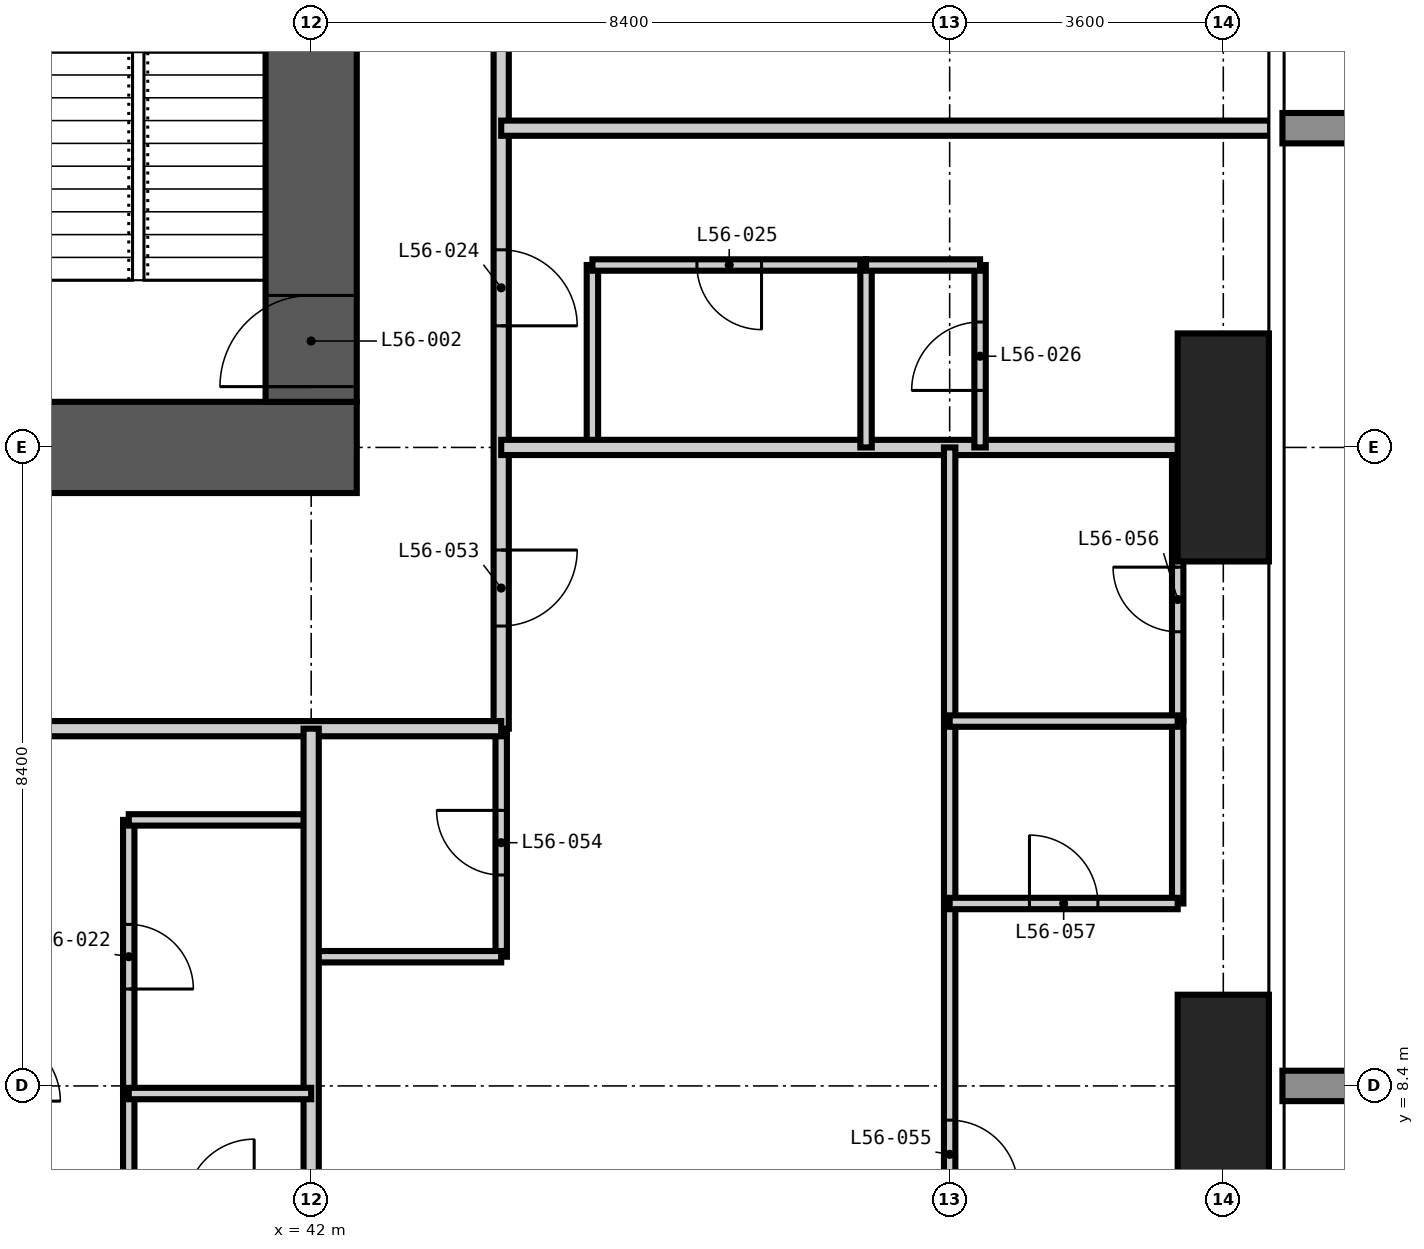
"""IFC4 building model, lengths in metres.
Left out: names, types, materials, properties, quantities, classifications, styles, units other than length and angle.
Written with IfcOpenShell. Run it as: python <this file> out.ifc"""

import sys

from ifc_helpers import new_model, si_unit, direction, frame, frame_2d, origin, origin_2d, place, context, subcontext, project, spatial, rectangle, extrude, element, fill, save


model = new_model("IFC4")
c1 = context("Model", 3, precision=1e-05, world=origin(), true_north=direction((0.0, 1.0)))
c2 = subcontext(c1, "Body", "Model", "MODEL_VIEW")
j1 = project(units=[si_unit("LENGTHUNIT", "METRE"), si_unit("PLANEANGLEUNIT", "RADIAN")], contexts=[c1])
p1 = place(None, origin())
s1 = spatial("IfcSite", under=j1, at=p1, CompositionType="ELEMENT")
p2 = place(p1, origin())
s2 = spatial("IfcBuilding", under=s1, at=p2, CompositionType="ELEMENT")
p3 = place(p2, frame((0.0, 0.0, 216.6)))
s3 = spatial("IfcBuildingStorey", under=s2, at=p3, CompositionType="ELEMENT", Elevation=216.6)
p4 = place(p3, frame((54.0, 8.4, -0.35), z_axis=(0.0, 0.0, 1.0), x_axis=(1.0, 0.0, 0.0)))
e1 = element("IfcColumn", 1, at=p4, inside=s3, PredefinedType="COLUMN", context=c2, shape_type="SweptSolid", body=[
    extrude(rectangle(XDim=1.2, YDim=2.4, at=origin_2d()), origin(), (0.0, 0.0, 1.0), 3.55),
])
p5 = place(p3, frame((54.0, 16.8, -0.35), z_axis=(0.0, 0.0, 1.0), x_axis=(1.0, 0.0, 0.0)))
e2 = element("IfcColumn", 2, at=p5, inside=s3, PredefinedType="COLUMN", context=c2, shape_type="SweptSolid", body=[
    extrude(rectangle(XDim=1.2, YDim=3.0, at=origin_2d()), origin(), (0.0, 0.0, 1.0), 3.55),
])
p6 = place(p3, frame((16.2, 16.8, -0.35), z_axis=(0.0, 0.0, 1.0), x_axis=(1.0, 0.0, 0.0)))
e3 = element("IfcWall", 3, at=p6, inside=s3, PredefinedType="SHEAR", context=c2, shape_type="SweptSolid", body=[
    extrude(rectangle(XDim=26.4, YDim=1.2, at=frame_2d((13.2, 0.0))), origin(), (0.0, 0.0, 1.0), 3.55),
])
p7 = place(p6, frame((12.7, 0.0, 0.35)))
e4 = element("IfcOpeningElement", 4, at=p7, cuts=e3, PredefinedType="OPENING", context=c2, shape_type="SweptSolid", body=[
    extrude(rectangle(XDim=1.0, YDim=2.1, at=frame_2d((0.5, 1.05))), frame((0.0, 0.61, 0.0), z_axis=(0.0, -1.0, 0.0), x_axis=(1.0, 0.0, 0.0)), (0.0, 0.0, 1.0), 1.22),
])
p8 = place(p6, frame((19.0, 0.0, 0.35)))
e5 = element("IfcOpeningElement", 5, at=p8, cuts=e3, PredefinedType="OPENING", context=c2, shape_type="SweptSolid", body=[
    extrude(rectangle(XDim=1.0, YDim=2.1, at=frame_2d((0.5, 1.05))), frame((0.0, 0.61, 0.0), z_axis=(0.0, -1.0, 0.0), x_axis=(1.0, 0.0, 0.0)), (0.0, 0.0, 1.0), 1.22),
])
p9 = place(p3, frame((42.0, 17.4, -0.35), z_axis=(0.0, 0.0, 1.0), x_axis=(0.0, 1.0, 0.0)))
e6 = element("IfcWall", 6, at=p9, inside=s3, PredefinedType="SHEAR", context=c2, shape_type="SweptSolid", body=[
    extrude(rectangle(XDim=24.0, YDim=1.2, at=frame_2d((12.0, 0.0))), origin(), (0.0, 0.0, 1.0), 3.55),
])
p10 = place(p9, frame((0.2, 0.0, 0.35)))
e7 = element("IfcOpeningElement", 7, at=p10, cuts=e6, PredefinedType="OPENING", context=c2, shape_type="SweptSolid", body=[
    extrude(rectangle(XDim=1.2, YDim=2.2, at=frame_2d((0.6, 1.1))), frame((0.0, 0.61, 0.0), z_axis=(0.0, -1.0, 0.0), x_axis=(1.0, 0.0, 0.0)), (0.0, 0.0, 1.0), 1.22),
])
p11 = place(p9, frame((11.5, 0.0, 0.35)))
e8 = element("IfcOpeningElement", 8, at=p11, cuts=e6, PredefinedType="OPENING", context=c2, shape_type="SweptSolid", body=[
    extrude(rectangle(XDim=1.0, YDim=2.1, at=frame_2d((0.5, 1.05))), frame((0.0, 0.61, 0.0), z_axis=(0.0, -1.0, 0.0), x_axis=(1.0, 0.0, 0.0)), (0.0, 0.0, 1.0), 1.22),
])
p12 = place(p9, frame((19.9, 0.0, 0.35)))
e9 = element("IfcOpeningElement", 9, at=p12, cuts=e6, PredefinedType="OPENING", context=c2, shape_type="SweptSolid", body=[
    extrude(rectangle(XDim=1.0, YDim=2.1, at=frame_2d((0.5, 1.05))), frame((0.0, 0.61, 0.0), z_axis=(0.0, -1.0, 0.0), x_axis=(1.0, 0.0, 0.0)), (0.0, 0.0, 1.0), 1.22),
])
p13 = place(p3, frame((39.6, 8.3, 0.0), z_axis=(0.0, 0.0, 1.0), x_axis=(0.0, 1.0, 0.0)))
e10 = element("IfcWall", 10, at=p13, inside=s3, PredefinedType="PARTITIONING", context=c2, shape_type="SweptSolid", body=[
    extrude(rectangle(XDim=3.6, YDim=0.15, at=frame_2d((1.8, 0.0))), origin(), (0.0, 0.0, 1.0), 3.2),
])
p14 = place(p13, frame((1.375, 0.0, 0.0)))
e11 = element("IfcOpeningElement", 11, at=p14, cuts=e10, PredefinedType="OPENING", context=c2, shape_type="SweptSolid", body=[
    extrude(rectangle(XDim=0.85, YDim=2.1, at=frame_2d((0.425, 1.05))), frame((0.0, 0.085, 0.0), z_axis=(0.0, -1.0, 0.0), x_axis=(1.0, 0.0, 0.0)), (0.0, 0.0, 1.0), 0.17),
])
p15 = place(p3, frame((44.5, 10.1, 0.0), z_axis=(0.0, 0.0, 1.0), x_axis=(0.0, 1.0, 0.0)))
e12 = element("IfcWall", 12, at=p15, inside=s3, PredefinedType="PARTITIONING", context=c2, shape_type="SweptSolid", body=[
    extrude(rectangle(XDim=3.0, YDim=0.15, at=frame_2d((1.5, 0.0))), origin(), (0.0, 0.0, 1.0), 3.2),
])
p16 = place(p15, frame((1.075, 0.0, 0.0)))
e13 = element("IfcOpeningElement", 13, at=p16, cuts=e12, PredefinedType="OPENING", context=c2, shape_type="SweptSolid", body=[
    extrude(rectangle(XDim=0.85, YDim=2.1, at=frame_2d((0.425, 1.05))), frame((0.0, 0.085, 0.0), z_axis=(0.0, -1.0, 0.0), x_axis=(1.0, 0.0, 0.0)), (0.0, 0.0, 1.0), 0.17),
])
p17 = place(p3, frame((45.7, 16.8, 0.0), z_axis=(0.0, 0.0, 1.0), x_axis=(0.0, 1.0, 0.0)))
e14 = element("IfcWall", 14, at=p17, inside=s3, PredefinedType="PARTITIONING", context=c2, shape_type="SweptSolid", body=[
    extrude(rectangle(XDim=2.4, YDim=0.15, at=frame_2d((1.2, 0.0))), origin(), (0.0, 0.0, 1.0), 3.2),
])
p18 = place(p3, frame((53.4, 13.2, 0.0), z_axis=(0.0, 0.0, 1.0), x_axis=(0.0, 1.0, 0.0)))
e15 = element("IfcWall", 15, at=p18, inside=s3, PredefinedType="PARTITIONING", context=c2, shape_type="SweptSolid", body=[
    extrude(rectangle(XDim=3.6, YDim=0.15, at=frame_2d((1.8, 0.0))), origin(), (0.0, 0.0, 1.0), 3.2),
])
p19 = place(p18, frame((1.175, 0.0, 0.0)))
e16 = element("IfcOpeningElement", 16, at=p19, cuts=e15, PredefinedType="OPENING", context=c2, shape_type="SweptSolid", body=[
    extrude(rectangle(XDim=0.85, YDim=2.1, at=frame_2d((0.425, 1.05))), frame((0.0, 0.085, 0.0), z_axis=(0.0, -1.0, 0.0), x_axis=(1.0, 0.0, 0.0)), (0.0, 0.0, 1.0), 0.17),
])
p20 = place(p3, frame((42.0, 10.1, 0.0), z_axis=(0.0, 0.0, 1.0), x_axis=(1.0, 0.0, 0.0)))
e17 = element("IfcWall", 17, at=p20, inside=s3, PredefinedType="PARTITIONING", context=c2, shape_type="SweptSolid", body=[
    extrude(rectangle(XDim=2.5, YDim=0.15, at=frame_2d((1.25, 0.0))), origin(), (0.0, 0.0, 1.0), 3.2),
])
p21 = place(p3, frame((39.6, 11.9, 0.0), z_axis=(0.0, 0.0, 1.0), x_axis=(1.0, 0.0, 0.0)))
e18 = element("IfcWall", 18, at=p21, inside=s3, PredefinedType="PARTITIONING", context=c2, shape_type="SweptSolid", body=[
    extrude(rectangle(XDim=2.4, YDim=0.15, at=frame_2d((1.2, 0.0))), origin(), (0.0, 0.0, 1.0), 3.2),
])
p22 = place(p3, frame((45.7, 19.2, 0.0), z_axis=(0.0, 0.0, 1.0), x_axis=(1.0, 0.0, 0.0)))
e19 = element("IfcWall", 19, at=p22, inside=s3, PredefinedType="PARTITIONING", context=c2, shape_type="SweptSolid", body=[
    extrude(rectangle(XDim=3.6, YDim=0.15, at=frame_2d((1.8, 0.0))), origin(), (0.0, 0.0, 1.0), 3.2),
])
p23 = place(p22, frame((1.375, 0.0, 0.0)))
e20 = element("IfcOpeningElement", 20, at=p23, cuts=e19, PredefinedType="OPENING", context=c2, shape_type="SweptSolid", body=[
    extrude(rectangle(XDim=0.85, YDim=2.1, at=frame_2d((0.425, 1.05))), frame((0.0, 0.085, 0.0), z_axis=(0.0, -1.0, 0.0), x_axis=(1.0, 0.0, 0.0)), (0.0, 0.0, 1.0), 0.17),
])
p24 = place(p3, frame((44.5, 45.1, 0.0), z_axis=(0.0, 0.0, 1.0), x_axis=(0.0, -1.0, 0.0)))
e21 = element("IfcWall", 21, at=p24, inside=s3, PredefinedType="PARTITIONING", context=c2, shape_type="SweptSolid", body=[
    extrude(rectangle(XDim=32.0, YDim=0.2, at=frame_2d((16.0, 0.0))), origin(), (0.0, 0.0, 1.0), 3.2),
])
p25 = place(p24, frame((25.7, 0.0, 0.0)))
e22 = element("IfcOpeningElement", 22, at=p25, cuts=e21, PredefinedType="OPENING", context=c2, shape_type="SweptSolid", body=[
    extrude(rectangle(XDim=1.0, YDim=2.2, at=frame_2d((0.5, 1.1))), frame((0.0, 0.11, 0.0), z_axis=(0.0, -1.0, 0.0), x_axis=(1.0, 0.0, 0.0)), (0.0, 0.0, 1.0), 0.22),
])
p26 = place(p24, frame((19.4, 0.0, 0.0)))
e23 = element("IfcOpeningElement", 23, at=p26, cuts=e21, PredefinedType="OPENING", context=c2, shape_type="SweptSolid", body=[
    extrude(rectangle(XDim=1.0, YDim=2.2, at=frame_2d((0.5, 1.1))), frame((0.0, 0.11, 0.0), z_axis=(0.0, -1.0, 0.0), x_axis=(1.0, 0.0, 0.0)), (0.0, 0.0, 1.0), 0.22),
])
p27 = place(p24, frame((11.0, 0.0, 0.0)))
e24 = element("IfcOpeningElement", 24, at=p27, cuts=e21, PredefinedType="OPENING", context=c2, shape_type="SweptSolid", body=[
    extrude(rectangle(XDim=1.0, YDim=2.2, at=frame_2d((0.5, 1.1))), frame((0.0, 0.11, 0.0), z_axis=(0.0, -1.0, 0.0), x_axis=(1.0, 0.0, 0.0)), (0.0, 0.0, 1.0), 0.22),
])
p28 = place(p24, frame((4.7, 0.0, 0.0)))
e25 = element("IfcOpeningElement", 25, at=p28, cuts=e21, PredefinedType="OPENING", context=c2, shape_type="SweptSolid", body=[
    extrude(rectangle(XDim=1.0, YDim=2.2, at=frame_2d((0.5, 1.1))), frame((0.0, 0.11, 0.0), z_axis=(0.0, -1.0, 0.0), x_axis=(1.0, 0.0, 0.0)), (0.0, 0.0, 1.0), 0.22),
])
p29 = place(p24, frame((29.65, 0.0, 0.0)))
e26 = element("IfcOpeningElement", 26, at=p29, cuts=e21, PredefinedType="OPENING", context=c2, shape_type="SweptSolid", body=[
    extrude(rectangle(XDim=1.0, YDim=2.2, at=frame_2d((0.5, 1.1))), frame((0.0, 0.11, 0.0), z_axis=(0.0, -1.0, 0.0), x_axis=(1.0, 0.0, 0.0)), (0.0, 0.0, 1.0), 0.22),
])
p30 = place(p24, frame((1.05, 0.0, 0.0)))
e27 = element("IfcOpeningElement", 27, at=p30, cuts=e21, PredefinedType="OPENING", context=c2, shape_type="SweptSolid", body=[
    extrude(rectangle(XDim=1.0, YDim=2.2, at=frame_2d((0.5, 1.1))), frame((0.0, 0.11, 0.0), z_axis=(0.0, -1.0, 0.0), x_axis=(1.0, 0.0, 0.0)), (0.0, 0.0, 1.0), 0.22),
])
p31 = place(p3, frame((44.5, 13.1, 0.0), z_axis=(0.0, 0.0, 1.0), x_axis=(-1.0, 0.0, 0.0)))
e28 = element("IfcWall", 28, at=p31, inside=s3, PredefinedType="PARTITIONING", context=c2, shape_type="SweptSolid", body=[
    extrude(rectangle(XDim=31.4, YDim=0.2, at=frame_2d((15.7, 0.0))), origin(), (0.0, 0.0, 1.0), 3.2),
])
p32 = place(p31, frame((24.2, 0.0, 0.0)))
e29 = element("IfcOpeningElement", 29, at=p32, cuts=e28, PredefinedType="OPENING", context=c2, shape_type="SweptSolid", body=[
    extrude(rectangle(XDim=1.0, YDim=2.2, at=frame_2d((0.5, 1.1))), frame((0.0, 0.11, 0.0), z_axis=(0.0, -1.0, 0.0), x_axis=(1.0, 0.0, 0.0)), (0.0, 0.0, 1.0), 0.22),
])
p33 = place(p31, frame((13.4, 0.0, 0.0)))
e30 = element("IfcOpeningElement", 30, at=p33, cuts=e28, PredefinedType="OPENING", context=c2, shape_type="SweptSolid", body=[
    extrude(rectangle(XDim=1.0, YDim=2.2, at=frame_2d((0.5, 1.1))), frame((0.0, 0.11, 0.0), z_axis=(0.0, -1.0, 0.0), x_axis=(1.0, 0.0, 0.0)), (0.0, 0.0, 1.0), 0.22),
])
p34 = place(p31, frame((7.4, 0.0, 0.0)))
e31 = element("IfcOpeningElement", 31, at=p34, cuts=e28, PredefinedType="OPENING", context=c2, shape_type="SweptSolid", body=[
    extrude(rectangle(XDim=1.0, YDim=2.2, at=frame_2d((0.5, 1.1))), frame((0.0, 0.11, 0.0), z_axis=(0.0, -1.0, 0.0), x_axis=(1.0, 0.0, 0.0)), (0.0, 0.0, 1.0), 0.22),
])
p35 = place(p3, frame((42.0, 4.182, 0.0), z_axis=(0.0, 0.0, 1.0), x_axis=(0.0, 1.0, 0.0)))
e32 = element("IfcWall", 32, at=p35, inside=s3, PredefinedType="PARTITIONING", context=c2, shape_type="SweptSolid", body=[
    extrude(rectangle(XDim=8.918, YDim=0.2, at=frame_2d((4.459, 0.0))), origin(), (0.0, 0.0, 1.0), 3.2),
])
for number, where, z_axis, x_axis in (
    (33, (44.5, 16.8, 0.0), (0.0, 0.0, 1.0), (1.0, 0.0, 0.0)),
    (34, (44.5, 21.0, 0.0), (0.0, 0.0, 1.0), (1.0, 0.0, 0.0)),
):
    element("IfcWall", number, at=place(p3, frame(where, z_axis=z_axis, x_axis=x_axis)), inside=s3, PredefinedType="PARTITIONING", context=c2, shape_type="SweptSolid", body=[
        extrude(rectangle(XDim=10.118, YDim=0.2, at=frame_2d((5.059, 0.0))), origin(), (0.0, 0.0, 1.0), 3.2),
    ])
p36 = place(p3, frame((39.6, 6.8, 0.0), z_axis=(0.0, 0.0, 1.0), x_axis=(0.0, 1.0, 0.0)))
e35 = element("IfcWall", 35, at=p36, inside=s3, PredefinedType="PARTITIONING", context=c2, shape_type="SweptSolid", body=[
    extrude(rectangle(XDim=1.5, YDim=0.15, at=frame_2d((0.75, 0.0))), origin(), (0.0, 0.0, 1.0), 3.2),
])
p37 = place(p3, frame((49.3, 16.8, 0.0), z_axis=(0.0, 0.0, 1.0), x_axis=(0.0, 1.0, 0.0)))
e36 = element("IfcWall", 36, at=p37, inside=s3, PredefinedType="PARTITIONING", context=c2, shape_type="SweptSolid", body=[
    extrude(rectangle(XDim=2.4, YDim=0.15, at=frame_2d((1.2, 0.0))), origin(), (0.0, 0.0, 1.0), 3.2),
])
p38 = place(p3, frame((50.4, 4.182, 0.0), z_axis=(0.0, 0.0, 1.0), x_axis=(0.0, 1.0, 0.0)))
e37 = element("IfcWall", 37, at=p38, inside=s3, PredefinedType="PARTITIONING", context=c2, shape_type="SweptSolid", body=[
    extrude(rectangle(XDim=12.618, YDim=0.15, at=frame_2d((6.309, 0.0))), origin(), (0.0, 0.0, 1.0), 3.2),
])
p39 = place(p38, frame((2.868, 0.0, 0.0)))
e38 = element("IfcOpeningElement", 38, at=p39, cuts=e37, PredefinedType="OPENING", context=c2, shape_type="SweptSolid", body=[
    extrude(rectangle(XDim=0.9, YDim=2.1, at=frame_2d((0.45, 1.05))), frame((0.0, 0.085, 0.0), z_axis=(0.0, -1.0, 0.0), x_axis=(1.0, 0.0, 0.0)), (0.0, 0.0, 1.0), 0.17),
])
p40 = place(p3, frame((50.8, 16.8, 0.0), z_axis=(0.0, 0.0, 1.0), x_axis=(0.0, 1.0, 0.0)))
e39 = element("IfcWall", 39, at=p40, inside=s3, PredefinedType="PARTITIONING", context=c2, shape_type="SweptSolid", body=[
    extrude(rectangle(XDim=2.4, YDim=0.15, at=frame_2d((1.2, 0.0))), origin(), (0.0, 0.0, 1.0), 3.2),
])
p41 = place(p40, frame((0.75, 0.0, 0.0)))
e40 = element("IfcOpeningElement", 40, at=p41, cuts=e39, PredefinedType="OPENING", context=c2, shape_type="SweptSolid", body=[
    extrude(rectangle(XDim=0.9, YDim=2.1, at=frame_2d((0.45, 1.05))), frame((0.0, 0.085, 0.0), z_axis=(0.0, -1.0, 0.0), x_axis=(1.0, 0.0, 0.0)), (0.0, 0.0, 1.0), 0.17),
])
for number, where, z_axis, x_axis in (
    (41, (53.4, 10.8, 0.0), (0.0, 0.0, 1.0), (0.0, 1.0, 0.0)),
    (42, (39.6, 8.3, 0.0), (0.0, 0.0, 1.0), (1.0, 0.0, 0.0)),
):
    element("IfcWall", number, at=place(p3, frame(where, z_axis=z_axis, x_axis=x_axis)), inside=s3, PredefinedType="PARTITIONING", context=c2, shape_type="SweptSolid", body=[
        extrude(rectangle(XDim=2.4, YDim=0.15, at=frame_2d((1.2, 0.0))), origin(), (0.0, 0.0, 1.0), 3.2),
    ])
p42 = place(p3, frame((50.4, 10.8, 0.0), z_axis=(0.0, 0.0, 1.0), x_axis=(1.0, 0.0, 0.0)))
e43 = element("IfcWall", 43, at=p42, inside=s3, PredefinedType="PARTITIONING", context=c2, shape_type="SweptSolid", body=[
    extrude(rectangle(XDim=3.0, YDim=0.15, at=frame_2d((1.5, 0.0))), origin(), (0.0, 0.0, 1.0), 3.2),
])
p43 = place(p42, frame((1.05, 0.0, 0.0)))
e44 = element("IfcOpeningElement", 44, at=p43, cuts=e43, PredefinedType="OPENING", context=c2, shape_type="SweptSolid", body=[
    extrude(rectangle(XDim=0.9, YDim=2.1, at=frame_2d((0.45, 1.05))), frame((0.0, 0.085, 0.0), z_axis=(0.0, -1.0, 0.0), x_axis=(1.0, 0.0, 0.0)), (0.0, 0.0, 1.0), 0.17),
])
p44 = place(p3, frame((50.4, 13.2, 0.0), z_axis=(0.0, 0.0, 1.0), x_axis=(1.0, 0.0, 0.0)))
e45 = element("IfcWall", 45, at=p44, inside=s3, PredefinedType="PARTITIONING", context=c2, shape_type="SweptSolid", body=[
    extrude(rectangle(XDim=3.0, YDim=0.15, at=frame_2d((1.5, 0.0))), origin(), (0.0, 0.0, 1.0), 3.2),
])
p45 = place(p3, frame((49.3, 19.2, 0.0), z_axis=(0.0, 0.0, 1.0), x_axis=(1.0, 0.0, 0.0)))
e46 = element("IfcWall", 46, at=p45, inside=s3, PredefinedType="PARTITIONING", context=c2, shape_type="SweptSolid", body=[
    extrude(rectangle(XDim=1.5, YDim=0.15, at=frame_2d((0.75, 0.0))), origin(), (0.0, 0.0, 1.0), 3.2),
])
p46 = place(p10, origin())
e47 = element("IfcDoor", 47, at=p46, inside=s3, OperationType="SINGLE_SWING_LEFT", PredefinedType="DOOR", context=c2, shape_type="SweptSolid", body=[
    extrude(rectangle(XDim=1.2, YDim=2.2, at=frame_2d((0.6, 1.1))), frame((0.0, 0.025, 0.0), z_axis=(0.0, -1.0, 0.0), x_axis=(1.0, 0.0, 0.0)), (0.0, 0.0, 1.0), 0.05),
])
fill(e7, e47)
p47 = place(p14, frame((0.85, 0.0, 0.0), z_axis=(0.0, 0.0, 1.0), x_axis=(-1.0, 0.0, 0.0)))
e48 = element("IfcDoor", 48, at=p47, inside=s3, OperationType="SINGLE_SWING_RIGHT", PredefinedType="DOOR", context=c2, shape_type="SweptSolid", body=[
    extrude(rectangle(XDim=0.85, YDim=2.1, at=frame_2d((0.425, 1.05))), frame((0.0, 0.025, 0.0), z_axis=(0.0, -1.0, 0.0), x_axis=(1.0, 0.0, 0.0)), (0.0, 0.0, 1.0), 0.05),
])
fill(e11, e48)
p48 = place(p25, origin())
e49 = element("IfcDoor", 49, at=p48, inside=s3, OperationType="SINGLE_SWING_RIGHT", PredefinedType="DOOR", context=c2, shape_type="SweptSolid", body=[
    extrude(rectangle(XDim=1.0, YDim=2.2, at=frame_2d((0.5, 1.1))), frame((0.0, 0.025, 0.0), z_axis=(0.0, -1.0, 0.0), x_axis=(1.0, 0.0, 0.0)), (0.0, 0.0, 1.0), 0.05),
])
fill(e22, e49)
p49 = place(p23, frame((0.85, 0.0, 0.0), z_axis=(0.0, 0.0, 1.0), x_axis=(-1.0, 0.0, 0.0)))
e50 = element("IfcDoor", 50, at=p49, inside=s3, OperationType="SINGLE_SWING_LEFT", PredefinedType="DOOR", context=c2, shape_type="SweptSolid", body=[
    extrude(rectangle(XDim=0.85, YDim=2.1, at=frame_2d((0.425, 1.05))), frame((0.0, 0.025, 0.0), z_axis=(0.0, -1.0, 0.0), x_axis=(1.0, 0.0, 0.0)), (0.0, 0.0, 1.0), 0.05),
])
fill(e20, e50)
p50 = place(p41, origin())
e51 = element("IfcDoor", 51, at=p50, inside=s3, OperationType="SINGLE_SWING_LEFT", PredefinedType="DOOR", context=c2, shape_type="SweptSolid", body=[
    extrude(rectangle(XDim=0.9, YDim=2.1, at=frame_2d((0.45, 1.05))), frame((0.0, 0.025, 0.0), z_axis=(0.0, -1.0, 0.0), x_axis=(1.0, 0.0, 0.0)), (0.0, 0.0, 1.0), 0.05),
])
fill(e40, e51)
p51 = place(p29, origin())
e52 = element("IfcDoor", 52, at=p51, inside=s3, OperationType="SINGLE_SWING_LEFT", PredefinedType="DOOR", context=c2, shape_type="SweptSolid", body=[
    extrude(rectangle(XDim=1.0, YDim=2.2, at=frame_2d((0.5, 1.1))), frame((0.0, 0.025, 0.0), z_axis=(0.0, -1.0, 0.0), x_axis=(1.0, 0.0, 0.0)), (0.0, 0.0, 1.0), 0.05),
])
fill(e26, e52)
p52 = place(p16, origin())
e53 = element("IfcDoor", 53, at=p52, inside=s3, OperationType="SINGLE_SWING_RIGHT", PredefinedType="DOOR", context=c2, shape_type="SweptSolid", body=[
    extrude(rectangle(XDim=0.85, YDim=2.1, at=frame_2d((0.425, 1.05))), frame((0.0, 0.025, 0.0), z_axis=(0.0, -1.0, 0.0), x_axis=(1.0, 0.0, 0.0)), (0.0, 0.0, 1.0), 0.05),
])
fill(e13, e53)
p53 = place(p39, frame((0.9, 0.0, 0.0), z_axis=(0.0, 0.0, 1.0), x_axis=(-1.0, 0.0, 0.0)))
e54 = element("IfcDoor", 54, at=p53, inside=s3, OperationType="SINGLE_SWING_RIGHT", PredefinedType="DOOR", context=c2, shape_type="SweptSolid", body=[
    extrude(rectangle(XDim=0.9, YDim=2.1, at=frame_2d((0.45, 1.05))), frame((0.0, 0.025, 0.0), z_axis=(0.0, -1.0, 0.0), x_axis=(1.0, 0.0, 0.0)), (0.0, 0.0, 1.0), 0.05),
])
fill(e38, e54)
p54 = place(p19, origin())
e55 = element("IfcDoor", 55, at=p54, inside=s3, OperationType="SINGLE_SWING_RIGHT", PredefinedType="DOOR", context=c2, shape_type="SweptSolid", body=[
    extrude(rectangle(XDim=0.85, YDim=2.1, at=frame_2d((0.425, 1.05))), frame((0.0, 0.025, 0.0), z_axis=(0.0, -1.0, 0.0), x_axis=(1.0, 0.0, 0.0)), (0.0, 0.0, 1.0), 0.05),
])
fill(e16, e55)
p55 = place(p43, origin())
e56 = element("IfcDoor", 56, at=p55, inside=s3, OperationType="SINGLE_SWING_LEFT", PredefinedType="DOOR", context=c2, shape_type="SweptSolid", body=[
    extrude(rectangle(XDim=0.9, YDim=2.1, at=frame_2d((0.45, 1.05))), frame((0.0, 0.025, 0.0), z_axis=(0.0, -1.0, 0.0), x_axis=(1.0, 0.0, 0.0)), (0.0, 0.0, 1.0), 0.05),
])
fill(e44, e56)
save(model, sys.argv[1])
